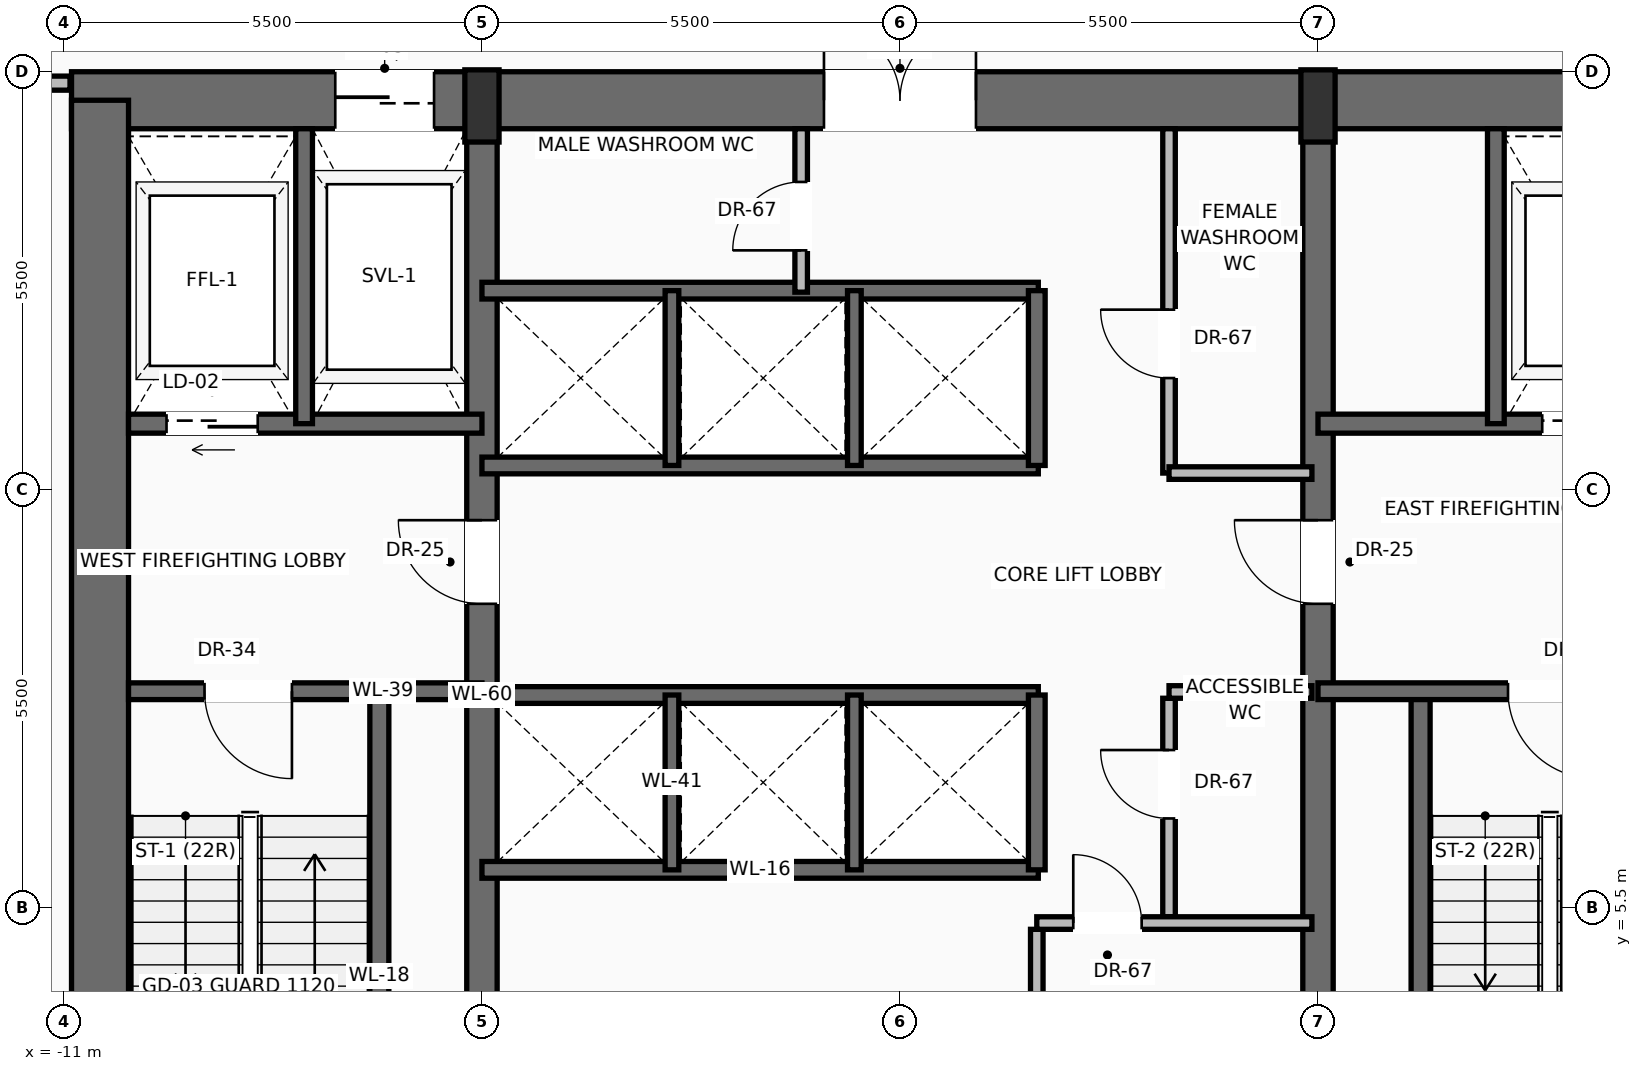
"""IFC4 building model, lengths in metres.
Left out: names, types, materials, properties, quantities, classifications, styles, units other than length and angle.
Written with IfcOpenShell. Run it as: python <this file> out.ifc"""

import sys

from ifc_helpers import new_model, si_unit, direction, frame, frame_2d, origin, origin_2d, place, context, subcontext, project, spatial, rectangle, extrude, source, transform, mapped, element, fill, save


model = new_model("IFC4")
c1 = context("Model", 3, precision=1e-05, world=origin(), true_north=direction((0.0, 1.0)))
c2 = subcontext(c1, "Body", "Model", "MODEL_VIEW")
j1 = project(units=[si_unit("LENGTHUNIT", "METRE"), si_unit("PLANEANGLEUNIT", "RADIAN")], contexts=[c1])
p1 = place(None, origin())
s1 = spatial("IfcSite", under=j1, at=p1, CompositionType="ELEMENT")
p2 = place(p1, origin())
s2 = spatial("IfcBuilding", under=s1, at=p2, CompositionType="ELEMENT")
p3 = place(p2, frame((0.0, 0.0, 113.6)))
s3 = spatial("IfcBuildingStorey", under=s2, at=p3, CompositionType="ELEMENT", Elevation=113.6)
p4 = place(p3, frame((-10.9, 16.125, 0.0), z_axis=(0.0, 0.0, 1.0), x_axis=(1.0, 0.0, 0.0)))
e1 = element("IfcWall", 1, at=p4, inside=s3, PredefinedType="SHEAR", context=c2, shape_type="SweptSolid", body=[
    extrude(rectangle(XDim=21.8, YDim=0.75, at=frame_2d((10.9, 0.0))), origin(), (0.0, 0.0, 1.0), 3.45),
])
p5 = place(p4, frame((3.47, 0.0, 0.0)))
e2 = element("IfcOpeningElement", 2, at=p5, cuts=e1, PredefinedType="OPENING", context=c2, shape_type="SweptSolid", body=[
    extrude(rectangle(XDim=1.3, YDim=2.3, at=frame_2d((0.65, 1.15))), frame((0.0, 0.385, 0.0), z_axis=(0.0, -1.0, 0.0), x_axis=(1.0, 0.0, 0.0)), (0.0, 0.0, 1.0), 0.77),
])
p6 = place(p4, frame((9.9, 0.0, 0.0)))
e3 = element("IfcOpeningElement", 3, at=p6, cuts=e1, PredefinedType="OPENING", context=c2, shape_type="SweptSolid", body=[
    extrude(rectangle(XDim=2.0, YDim=2.4, at=frame_2d((1.0, 1.2))), frame((0.0, 0.385, 0.0), z_axis=(0.0, -1.0, 0.0), x_axis=(1.0, 0.0, 0.0)), (0.0, 0.0, 1.0), 0.77),
])
p7 = place(p3, frame((-10.525, 0.475, 0.0), z_axis=(0.0, 0.0, 1.0), x_axis=(0.0, 1.0, 0.0)))
e4 = element("IfcWall", 4, at=p7, inside=s3, PredefinedType="SHEAR", context=c2, shape_type="SweptSolid", body=[
    extrude(rectangle(XDim=15.65, YDim=0.75, at=frame_2d((7.825, 0.0))), origin(), (0.0, 0.0, 1.0), 3.45),
])
p8 = place(p3, frame((-5.5, 0.475, 0.0), z_axis=(0.0, 0.0, 1.0), x_axis=(0.0, 1.0, 0.0)))
e5 = element("IfcWall", 5, at=p8, inside=s3, PredefinedType="SHEAR", context=c2, shape_type="SweptSolid", body=[
    extrude(rectangle(XDim=15.65, YDim=0.4, at=frame_2d((7.825, 0.0))), origin(), (0.0, 0.0, 1.0), 3.45),
])
p9 = place(p8, frame((9.025, 0.0, 0.0)))
e6 = element("IfcOpeningElement", 6, at=p9, cuts=e5, PredefinedType="OPENING", context=c2, shape_type="SweptSolid", body=[
    extrude(rectangle(XDim=1.1, YDim=2.2, at=frame_2d((0.55, 1.1))), frame((0.0, 0.21, 0.0), z_axis=(0.0, -1.0, 0.0), x_axis=(1.0, 0.0, 0.0)), (0.0, 0.0, 1.0), 0.42),
])
p10 = place(p3, frame((5.5, 0.475, 0.0), z_axis=(0.0, 0.0, 1.0), x_axis=(0.0, 1.0, 0.0)))
e7 = element("IfcWall", 7, at=p10, inside=s3, PredefinedType="SHEAR", context=c2, shape_type="SweptSolid", body=[
    extrude(rectangle(XDim=15.65, YDim=0.4, at=frame_2d((7.825, 0.0))), origin(), (0.0, 0.0, 1.0), 3.45),
])
p11 = place(p10, frame((9.025, 0.0, 0.0)))
e8 = element("IfcOpeningElement", 8, at=p11, cuts=e7, PredefinedType="OPENING", context=c2, shape_type="SweptSolid", body=[
    extrude(rectangle(XDim=1.1, YDim=2.2, at=frame_2d((0.55, 1.1))), frame((0.0, 0.21, 0.0), z_axis=(0.0, -1.0, 0.0), x_axis=(1.0, 0.0, 0.0)), (0.0, 0.0, 1.0), 0.42),
])
m1 = source(origin(), c2, "Body", "SweptSolid", [
    extrude(rectangle(XDim=0.45, YDim=0.95, at=origin_2d()), origin(), (0.0, 0.0, 1.0), 3.7),
])
for number, where, z_axis, x_axis in (
    (9, (-5.5, 16.05, 0.0), (0.0, 0.0, 1.0), (1.0, 0.0, 0.0)),
    (10, (5.5, 16.05, 0.0), (0.0, 0.0, 1.0), (1.0, 0.0, 0.0)),
):
    element("IfcColumn", number, at=place(p3, frame(where, z_axis=z_axis, x_axis=x_axis)), inside=s3, PredefinedType="PILASTER", context=c2, shape_type="MappedRepresentation", body=[
        mapped(m1, transform((0.0, 0.0, 0.0), scale=1.0)),
    ])
p12 = place(p3, frame((-6.85, 0.85, 0.0), z_axis=(0.0, 0.0, 1.0), x_axis=(0.0, 1.0, 0.0)))
e11 = element("IfcWall", 11, at=p12, inside=s3, PredefinedType="SOLIDWALL", context=c2, shape_type="SweptSolid", body=[
    extrude(rectangle(XDim=7.5, YDim=0.25, at=frame_2d((3.75, 0.0))), origin(), (0.0, 0.0, 1.0), 3.45),
])
p13 = place(p3, frame((-5.5, 8.35, 0.0), z_axis=(0.0, 0.0, 1.0), x_axis=(-1.0, 0.0, 0.0)))
e12 = element("IfcWall", 12, at=p13, inside=s3, PredefinedType="SOLIDWALL", context=c2, shape_type="SweptSolid", body=[
    extrude(rectangle(XDim=4.65, YDim=0.22, at=frame_2d((2.325, 0.0))), origin(), (0.0, 0.0, 1.0), 3.45),
])
p14 = place(p13, frame((2.5, 0.0, 0.0)))
e13 = element("IfcOpeningElement", 13, at=p14, cuts=e12, PredefinedType="OPENING", context=c2, shape_type="SweptSolid", body=[
    extrude(rectangle(XDim=1.15, YDim=2.2, at=frame_2d((0.575, 1.1))), frame((0.0, 0.12, 0.0), z_axis=(0.0, -1.0, 0.0), x_axis=(1.0, 0.0, 0.0)), (0.0, 0.0, 1.0), 0.24),
])
p15 = place(p3, frame((-5.5, 11.87, 0.0), z_axis=(0.0, 0.0, 1.0), x_axis=(-1.0, 0.0, 0.0)))
e14 = element("IfcWall", 14, at=p15, inside=s3, PredefinedType="SOLIDWALL", context=c2, shape_type="SweptSolid", body=[
    extrude(rectangle(XDim=4.65, YDim=0.25, at=frame_2d((2.325, 0.0))), origin(), (0.0, 0.0, 1.0), 3.45),
])
p16 = place(p15, frame((2.95, 0.0, 0.0)))
e15 = element("IfcOpeningElement", 15, at=p16, cuts=e14, PredefinedType="OPENING", context=c2, shape_type="SweptSolid", body=[
    extrude(rectangle(XDim=1.2, YDim=2.25, at=frame_2d((0.6, 1.125))), frame((0.0, 0.135, 0.0), z_axis=(0.0, -1.0, 0.0), x_axis=(1.0, 0.0, 0.0)), (0.0, 0.0, 1.0), 0.27),
])
p17 = place(p3, frame((-7.84, 11.87, 0.0), z_axis=(0.0, 0.0, 1.0), x_axis=(0.0, 1.0, 0.0)))
e16 = element("IfcWall", 16, at=p17, inside=s3, PredefinedType="SOLIDWALL", context=c2, shape_type="SweptSolid", body=[
    extrude(rectangle(XDim=3.88, YDim=0.22, at=frame_2d((1.94, 0.0))), origin(), (0.0, 0.0, 1.0), 3.45),
])
p18 = place(p3, frame((6.85, 0.85, 0.0), z_axis=(0.0, 0.0, 1.0), x_axis=(0.0, 1.0, 0.0)))
e17 = element("IfcWall", 17, at=p18, inside=s3, PredefinedType="SOLIDWALL", context=c2, shape_type="SweptSolid", body=[
    extrude(rectangle(XDim=7.5, YDim=0.25, at=frame_2d((3.75, 0.0))), origin(), (0.0, 0.0, 1.0), 3.45),
])
p19 = place(p3, frame((10.15, 8.35, 0.0), z_axis=(0.0, 0.0, 1.0), x_axis=(-1.0, 0.0, 0.0)))
e18 = element("IfcWall", 18, at=p19, inside=s3, PredefinedType="SOLIDWALL", context=c2, shape_type="SweptSolid", body=[
    extrude(rectangle(XDim=4.65, YDim=0.22, at=frame_2d((2.325, 0.0))), origin(), (0.0, 0.0, 1.0), 3.45),
])
p20 = place(p19, frame((1.0, 0.0, 0.0)))
e19 = element("IfcOpeningElement", 19, at=p20, cuts=e18, PredefinedType="OPENING", context=c2, shape_type="SweptSolid", body=[
    extrude(rectangle(XDim=1.15, YDim=2.2, at=frame_2d((0.575, 1.1))), frame((0.0, 0.12, 0.0), z_axis=(0.0, -1.0, 0.0), x_axis=(1.0, 0.0, 0.0)), (0.0, 0.0, 1.0), 0.24),
])
p21 = place(p3, frame((10.15, 11.87, 0.0), z_axis=(0.0, 0.0, 1.0), x_axis=(-1.0, 0.0, 0.0)))
e20 = element("IfcWall", 20, at=p21, inside=s3, PredefinedType="SOLIDWALL", context=c2, shape_type="SweptSolid", body=[
    extrude(rectangle(XDim=4.65, YDim=0.25, at=frame_2d((2.325, 0.0))), origin(), (0.0, 0.0, 1.0), 3.45),
])
p22 = place(p21, frame((0.5, 0.0, 0.0)))
e21 = element("IfcOpeningElement", 21, at=p22, cuts=e20, PredefinedType="OPENING", context=c2, shape_type="SweptSolid", body=[
    extrude(rectangle(XDim=1.2, YDim=2.25, at=frame_2d((0.6, 1.125))), frame((0.0, 0.135, 0.0), z_axis=(0.0, -1.0, 0.0), x_axis=(1.0, 0.0, 0.0)), (0.0, 0.0, 1.0), 0.27),
])
p23 = place(p3, frame((7.84, 11.87, 0.0), z_axis=(0.0, 0.0, 1.0), x_axis=(0.0, 1.0, 0.0)))
e22 = element("IfcWall", 22, at=p23, inside=s3, PredefinedType="SOLIDWALL", context=c2, shape_type="SweptSolid", body=[
    extrude(rectangle(XDim=3.88, YDim=0.22, at=frame_2d((1.94, 0.0))), origin(), (0.0, 0.0, 1.0), 3.45),
])
p24 = place(p3, frame((1.8, 3.16, 0.0), z_axis=(0.0, 0.0, 1.0), x_axis=(0.0, 1.0, 0.0)))
e23 = element("IfcWall", 23, at=p24, inside=s3, PredefinedType="PARTITIONING", context=c2, shape_type="SweptSolid", body=[
    extrude(rectangle(XDim=2.058, YDim=0.165, at=frame_2d((1.029, 0.0))), origin(), (0.0, 0.0, 1.0), 3.442),
])
p25 = place(p3, frame((3.54, 5.383, 0.0), z_axis=(0.0, 0.0, 1.0), x_axis=(0.0, 1.0, 0.0)))
e24 = element("IfcWall", 24, at=p25, inside=s3, PredefinedType="PARTITIONING", context=c2, shape_type="SweptSolid", body=[
    extrude(rectangle(XDim=2.875, YDim=0.165, at=frame_2d((1.438, 0.0))), origin(), (0.0, 0.0, 1.0), 3.442),
])
p26 = place(p25, frame((1.294, 0.0, 0.0)))
e25 = element("IfcOpeningElement", 25, at=p26, cuts=e24, PredefinedType="OPENING", context=c2, shape_type="SweptSolid", body=[
    extrude(rectangle(XDim=0.9, YDim=2.1, at=frame_2d((0.45, 1.05))), frame((0.0, 0.093, 0.0), z_axis=(0.0, -1.0, 0.0), x_axis=(1.0, 0.0, 0.0)), (0.0, 0.0, 1.0), 0.185),
])
p27 = place(p3, frame((3.54, 8.34, 0.0), z_axis=(0.0, 0.0, 1.0), x_axis=(1.0, 0.0, 0.0)))
e26 = element("IfcWall", 26, at=p27, inside=s3, PredefinedType="PARTITIONING", context=c2, shape_type="SweptSolid", body=[
    extrude(rectangle(XDim=1.88, YDim=0.165, at=frame_2d((0.94, 0.0))), origin(), (0.0, 0.0, 1.0), 3.442),
])
p28 = place(p3, frame((1.8, 5.3, 0.0), z_axis=(0.0, 0.0, 1.0), x_axis=(1.0, 0.0, 0.0)))
e27 = element("IfcWall", 27, at=p28, inside=s3, PredefinedType="PARTITIONING", context=c2, shape_type="SweptSolid", body=[
    extrude(rectangle(XDim=3.62, YDim=0.165, at=frame_2d((1.81, 0.0))), origin(), (0.0, 0.0, 1.0), 3.442),
])
p29 = place(p28, frame((0.48, 0.0, 0.0)))
e28 = element("IfcOpeningElement", 28, at=p29, cuts=e27, PredefinedType="OPENING", context=c2, shape_type="SweptSolid", body=[
    extrude(rectangle(XDim=0.9, YDim=2.1, at=frame_2d((0.45, 1.05))), frame((0.0, 0.093, 0.0), z_axis=(0.0, -1.0, 0.0), x_axis=(1.0, 0.0, 0.0)), (0.0, 0.0, 1.0), 0.185),
])
for number, where, z_axis, x_axis in (
    (29, (-5.5, 6.0, 0.0), (0.0, 0.0, 1.0), (1.0, 0.0, 0.0)),
    (30, (-5.5, 8.3, 0.0), (0.0, 0.0, 1.0), (1.0, 0.0, 0.0)),
):
    element("IfcWall", number, at=place(p3, frame(where, z_axis=z_axis, x_axis=x_axis)), inside=s3, PredefinedType="SOLIDWALL", context=c2, shape_type="SweptSolid", body=[
        extrude(rectangle(XDim=7.32, YDim=0.22, at=frame_2d((3.66, 0.0))), origin(), (0.0, 0.0, 1.0), 3.45),
    ])
p30 = place(p3, frame((1.8, 6.0, 0.0), z_axis=(0.0, 0.0, 1.0), x_axis=(0.0, 1.0, 0.0)))
e31 = element("IfcWall", 31, at=p30, inside=s3, PredefinedType="SOLIDWALL", context=c2, shape_type="SweptSolid", body=[
    extrude(rectangle(XDim=2.3, YDim=0.22, at=frame_2d((1.15, 0.0))), origin(), (0.0, 0.0, 1.0), 3.45),
])
for number, where, z_axis, x_axis in (
    (32, (-3.0, 6.0, 0.0), (0.0, 0.0, 1.0), (0.0, 1.0, 0.0)),
    (33, (-0.6, 6.0, 0.0), (0.0, 0.0, 1.0), (0.0, 1.0, 0.0)),
):
    element("IfcWall", number, at=place(p3, frame(where, z_axis=z_axis, x_axis=x_axis)), inside=s3, PredefinedType="SOLIDWALL", context=c2, shape_type="SweptSolid", body=[
        extrude(rectangle(XDim=2.3, YDim=0.18, at=frame_2d((1.15, 0.0))), origin(), (0.0, 0.0, 1.0), 3.45),
    ])
for number, where, z_axis, x_axis in (
    (34, (-5.5, 11.32, 0.0), (0.0, 0.0, 1.0), (1.0, 0.0, 0.0)),
    (35, (-5.5, 13.62, 0.0), (0.0, 0.0, 1.0), (1.0, 0.0, 0.0)),
):
    element("IfcWall", number, at=place(p3, frame(where, z_axis=z_axis, x_axis=x_axis)), inside=s3, PredefinedType="SOLIDWALL", context=c2, shape_type="SweptSolid", body=[
        extrude(rectangle(XDim=7.32, YDim=0.22, at=frame_2d((3.66, 0.0))), origin(), (0.0, 0.0, 1.0), 3.45),
    ])
p31 = place(p3, frame((1.8, 11.32, 0.0), z_axis=(0.0, 0.0, 1.0), x_axis=(0.0, 1.0, 0.0)))
e36 = element("IfcWall", 36, at=p31, inside=s3, PredefinedType="SOLIDWALL", context=c2, shape_type="SweptSolid", body=[
    extrude(rectangle(XDim=2.3, YDim=0.22, at=frame_2d((1.15, 0.0))), origin(), (0.0, 0.0, 1.0), 3.45),
])
for number, where, z_axis, x_axis in (
    (37, (-3.0, 11.32, 0.0), (0.0, 0.0, 1.0), (0.0, 1.0, 0.0)),
    (38, (-0.6, 11.32, 0.0), (0.0, 0.0, 1.0), (0.0, 1.0, 0.0)),
):
    element("IfcWall", number, at=place(p3, frame(where, z_axis=z_axis, x_axis=x_axis)), inside=s3, PredefinedType="SOLIDWALL", context=c2, shape_type="SweptSolid", body=[
        extrude(rectangle(XDim=2.3, YDim=0.18, at=frame_2d((1.15, 0.0))), origin(), (0.0, 0.0, 1.0), 3.45),
    ])
p32 = place(p3, frame((-1.3, 13.6, 0.0), z_axis=(0.0, 0.0, 1.0), x_axis=(0.0, 1.0, 0.0)))
e39 = element("IfcWall", 39, at=p32, inside=s3, PredefinedType="PARTITIONING", context=c2, shape_type="SweptSolid", body=[
    extrude(rectangle(XDim=2.15, YDim=0.165, at=frame_2d((1.075, 0.0))), origin(), (0.0, 0.0, 1.0), 3.442),
])
p33 = place(p32, frame((0.55, 0.0, 0.0)))
e40 = element("IfcOpeningElement", 40, at=p33, cuts=e39, PredefinedType="OPENING", context=c2, shape_type="SweptSolid", body=[
    extrude(rectangle(XDim=0.9, YDim=2.1, at=frame_2d((0.45, 1.05))), frame((0.0, 0.093, 0.0), z_axis=(0.0, -1.0, 0.0), x_axis=(1.0, 0.0, 0.0)), (0.0, 0.0, 1.0), 0.185),
])
p34 = place(p3, frame((3.54, 11.22, 0.0), z_axis=(0.0, 0.0, 1.0), x_axis=(0.0, 1.0, 0.0)))
e41 = element("IfcWall", 41, at=p34, inside=s3, PredefinedType="PARTITIONING", context=c2, shape_type="SweptSolid", body=[
    extrude(rectangle(XDim=4.53, YDim=0.165, at=frame_2d((2.265, 0.0))), origin(), (0.0, 0.0, 1.0), 3.442),
])
p35 = place(p34, frame((1.25, 0.0, 0.0)))
e42 = element("IfcOpeningElement", 42, at=p35, cuts=e41, PredefinedType="OPENING", context=c2, shape_type="SweptSolid", body=[
    extrude(rectangle(XDim=0.9, YDim=2.1, at=frame_2d((0.45, 1.05))), frame((0.0, 0.093, 0.0), z_axis=(0.0, -1.0, 0.0), x_axis=(1.0, 0.0, 0.0)), (0.0, 0.0, 1.0), 0.185),
])
p36 = place(p3, frame((3.54, 11.22, 0.0), z_axis=(0.0, 0.0, 1.0), x_axis=(1.0, 0.0, 0.0)))
e43 = element("IfcWall", 43, at=p36, inside=s3, PredefinedType="PARTITIONING", context=c2, shape_type="SweptSolid", body=[
    extrude(rectangle(XDim=1.88, YDim=0.165, at=frame_2d((0.94, 0.0))), origin(), (0.0, 0.0, 1.0), 3.442),
])
p37 = place(p3, frame((-22.429, 16.35, 0.0), z_axis=(0.0, 0.0, 1.0), x_axis=(1.0, 0.0, 0.0)))
e44 = element("IfcWall", 44, at=p37, inside=s3, PredefinedType="PARTITIONING", context=c2, shape_type="SweptSolid", body=[
    extrude(rectangle(XDim=11.509, YDim=0.185, at=frame_2d((5.754, 0.0))), origin(), (0.0, 0.0, 1.0), 2.747),
])
p38 = place(p37, frame((4.738, 0.0, 0.0)))
e45 = element("IfcOpeningElement", 45, at=p38, cuts=e44, PredefinedType="OPENING", context=c2, shape_type="SweptSolid", body=[
    extrude(rectangle(XDim=0.95, YDim=2.2, at=frame_2d((0.475, 1.1))), frame((0.0, 0.103, 0.0), z_axis=(0.0, -1.0, 0.0), x_axis=(1.0, 0.0, 0.0)), (0.0, 0.0, 1.0), 0.205),
])
m2 = source(origin(), c2, "Body", "SweptSolid", [
    extrude(rectangle(XDim=1.15, YDim=2.2, at=frame_2d((0.575, 1.1))), frame((0.0, 0.025, 0.0), z_axis=(0.0, -1.0, 0.0), x_axis=(1.0, 0.0, 0.0)), (0.0, 0.0, 1.0), 0.05),
])
p39 = place(p14, origin())
e46 = element("IfcDoor", 46, at=p39, inside=s3, OperationType="SINGLE_SWING_LEFT", PredefinedType="DOOR", context=c2, shape_type="MappedRepresentation", body=[
    mapped(m2, transform((0.0, 0.0, 0.0), scale=1.0)),
])
fill(e13, e46)
m3 = source(origin(), c2, "Body", "SweptSolid", [
    extrude(rectangle(XDim=1.1, YDim=2.2, at=frame_2d((0.55, 1.1))), frame((0.0, 0.025, 0.0), z_axis=(0.0, -1.0, 0.0), x_axis=(1.0, 0.0, 0.0)), (0.0, 0.0, 1.0), 0.05),
])
p40 = place(p9, origin())
e47 = element("IfcDoor", 47, at=p40, inside=s3, OperationType="SINGLE_SWING_RIGHT", PredefinedType="DOOR", context=c2, shape_type="MappedRepresentation", body=[
    mapped(m3, transform((0.0, 0.0, 0.0), scale=1.0)),
])
fill(e6, e47)
m4 = source(origin(), c2, "Body", "SweptSolid", [
    extrude(rectangle(XDim=1.2, YDim=2.25, at=frame_2d((0.6, 1.125))), frame((0.0, 0.025, 0.0), z_axis=(0.0, -1.0, 0.0), x_axis=(1.0, 0.0, 0.0)), (0.0, 0.0, 1.0), 0.05),
])
p41 = place(p16, origin())
e48 = element("IfcDoor", 48, at=p41, inside=s3, OperationType="SLIDING_TO_LEFT", PredefinedType="DOOR", context=c2, shape_type="MappedRepresentation", body=[
    mapped(m4, transform((0.0, 0.0, 0.0), scale=1.0)),
])
fill(e15, e48)
m5 = source(origin(), c2, "Body", "SweptSolid", [
    extrude(rectangle(XDim=1.3, YDim=2.3, at=frame_2d((0.65, 1.15))), frame((0.0, 0.025, 0.0), z_axis=(0.0, -1.0, 0.0), x_axis=(1.0, 0.0, 0.0)), (0.0, 0.0, 1.0), 0.05),
])
p42 = place(p5, origin())
e49 = element("IfcDoor", 49, at=p42, inside=s3, OperationType="SLIDING_TO_RIGHT", PredefinedType="DOOR", context=c2, shape_type="MappedRepresentation", body=[
    mapped(m5, transform((0.0, 0.0, 0.0), scale=1.0)),
])
fill(e2, e49)
p43 = place(p20, origin())
e50 = element("IfcDoor", 50, at=p43, inside=s3, OperationType="SINGLE_SWING_LEFT", PredefinedType="DOOR", context=c2, shape_type="MappedRepresentation", body=[
    mapped(m2, transform((0.0, 0.0, 0.0), scale=1.0)),
])
fill(e19, e50)
p44 = place(p11, origin())
e51 = element("IfcDoor", 51, at=p44, inside=s3, OperationType="SINGLE_SWING_RIGHT", PredefinedType="DOOR", context=c2, shape_type="MappedRepresentation", body=[
    mapped(m3, transform((0.0, 0.0, 0.0), scale=1.0)),
])
fill(e8, e51)
p45 = place(p22, origin())
e52 = element("IfcDoor", 52, at=p45, inside=s3, OperationType="SLIDING_TO_RIGHT", PredefinedType="DOOR", context=c2, shape_type="MappedRepresentation", body=[
    mapped(m4, transform((0.0, 0.0, 0.0), scale=1.0)),
])
fill(e21, e52)
m6 = source(origin(), c2, "Body", "SweptSolid", [
    extrude(rectangle(XDim=2.0, YDim=2.4, at=frame_2d((1.0, 1.2))), frame((0.0, 0.025, 0.0), z_axis=(0.0, -1.0, 0.0), x_axis=(1.0, 0.0, 0.0)), (0.0, 0.0, 1.0), 0.05),
])
p46 = place(p6, origin())
e53 = element("IfcDoor", 53, at=p46, inside=s3, OperationType="DOUBLE_DOOR_SINGLE_SWING", PredefinedType="DOOR", context=c2, shape_type="MappedRepresentation", body=[
    mapped(m6, transform((0.0, 0.0, 0.0), scale=1.0)),
])
fill(e3, e53)
m7 = source(origin(), c2, "Body", "SweptSolid", [
    extrude(rectangle(XDim=0.9, YDim=2.1, at=frame_2d((0.45, 1.05))), frame((0.0, 0.025, 0.0), z_axis=(0.0, -1.0, 0.0), x_axis=(1.0, 0.0, 0.0)), (0.0, 0.0, 1.0), 0.05),
])
p47 = place(p29, origin())
e54 = element("IfcDoor", 54, at=p47, inside=s3, OperationType="SINGLE_SWING_LEFT", PredefinedType="DOOR", context=c2, shape_type="MappedRepresentation", body=[
    mapped(m7, transform((0.0, 0.0, 0.0), scale=1.0)),
])
fill(e28, e54)
p48 = place(p26, origin())
e55 = element("IfcDoor", 55, at=p48, inside=s3, OperationType="SINGLE_SWING_RIGHT", PredefinedType="DOOR", context=c2, shape_type="MappedRepresentation", body=[
    mapped(m7, transform((0.0, 0.0, 0.0), scale=1.0)),
])
fill(e25, e55)
p49 = place(p33, origin())
e56 = element("IfcDoor", 56, at=p49, inside=s3, OperationType="SINGLE_SWING_LEFT", PredefinedType="DOOR", context=c2, shape_type="MappedRepresentation", body=[
    mapped(m7, transform((0.0, 0.0, 0.0), scale=1.0)),
])
fill(e40, e56)
p50 = place(p35, origin())
e57 = element("IfcDoor", 57, at=p50, inside=s3, OperationType="SINGLE_SWING_RIGHT", PredefinedType="DOOR", context=c2, shape_type="MappedRepresentation", body=[
    mapped(m7, transform((0.0, 0.0, 0.0), scale=1.0)),
])
fill(e42, e57)
save(model, sys.argv[1])
